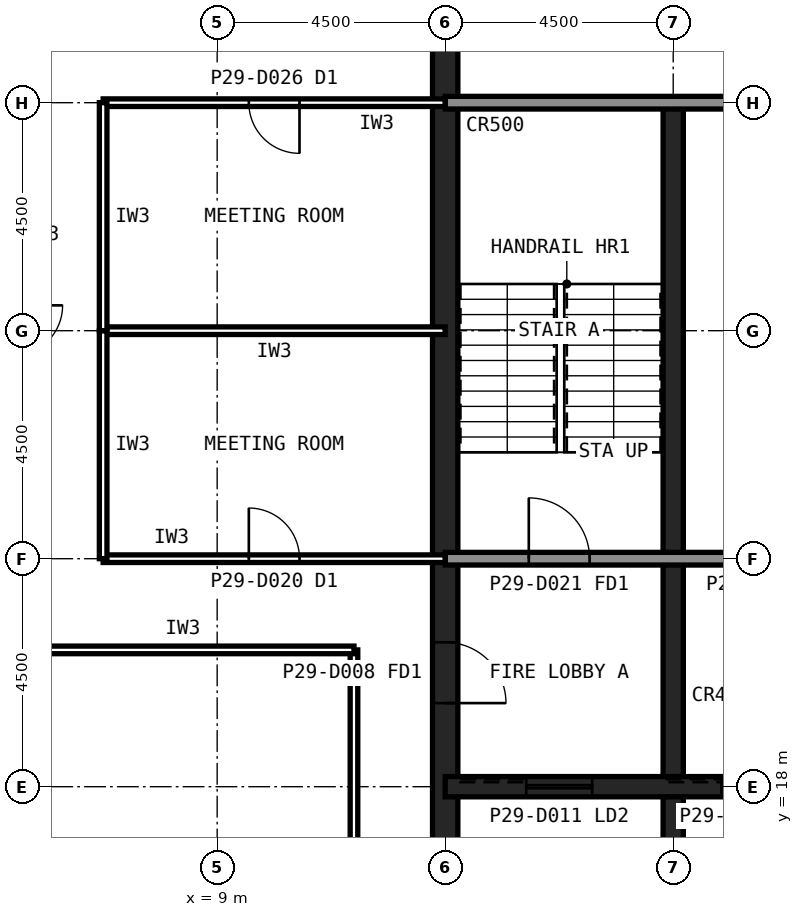
"""IFC4 building model, lengths in metres.
Left out: names, types, materials, properties, quantities, classifications, styles, units other than length and angle.
Written with IfcOpenShell. Run it as: python <this file> out.ifc"""

import sys

from ifc_helpers import new_model, si_unit, direction, frame, frame_2d, origin, place, context, subcontext, project, spatial, rectangle, extrude, element, fill, save


model = new_model("IFC4")
c1 = context("Model", 3, precision=1e-05, world=origin(), true_north=direction((0.0, 1.0)))
c2 = subcontext(c1, "Body", "Model", "MODEL_VIEW")
j1 = project(units=[si_unit("LENGTHUNIT", "METRE"), si_unit("PLANEANGLEUNIT", "RADIAN")], contexts=[c1])
p1 = place(None, origin())
s1 = spatial("IfcSite", under=j1, at=p1, CompositionType="ELEMENT")
p2 = place(p1, origin())
s2 = spatial("IfcBuilding", under=s1, at=p2, CompositionType="ELEMENT")
p3 = place(p2, frame((0.0, 0.0, 127.6)))
s3 = spatial("IfcBuildingStorey", under=s2, at=p3, CompositionType="ELEMENT", Elevation=127.6)
p4 = place(p3, frame((13.5, 40.5, 0.0), z_axis=(0.0, 0.0, 1.0), x_axis=(0.0, -1.0, 0.0)))
e1 = element("IfcWall", 1, at=p4, inside=s3, PredefinedType="SHEAR", context=c2, shape_type="SweptSolid", body=[
    extrude(rectangle(XDim=27.0, YDim=0.5, at=frame_2d((13.5, 0.0))), origin(), (0.0, 0.0, 1.0), 4.0),
])
p5 = place(p4, frame((19.65, 0.0, 0.0)))
e2 = element("IfcOpeningElement", 2, at=p5, cuts=e1, PredefinedType="OPENING", context=c2, shape_type="SweptSolid", body=[
    extrude(rectangle(XDim=1.2, YDim=2.1, at=frame_2d((0.6, 1.05))), frame((0.0, 0.26, 0.0), z_axis=(0.0, -1.0, 0.0), x_axis=(1.0, 0.0, 0.0)), (0.0, 0.0, 1.0), 0.52),
])
p6 = place(p4, frame((5.85, 0.0, 0.0)))
e3 = element("IfcOpeningElement", 3, at=p6, cuts=e1, PredefinedType="OPENING", context=c2, shape_type="SweptSolid", body=[
    extrude(rectangle(XDim=1.8, YDim=2.1, at=frame_2d((0.9, 1.05))), frame((0.0, 0.26, 0.0), z_axis=(0.0, -1.0, 0.0), x_axis=(1.0, 0.0, 0.0)), (0.0, 0.0, 1.0), 0.52),
])
p7 = place(p3, frame((18.0, 13.5, 0.0), z_axis=(0.0, 0.0, 1.0), x_axis=(0.0, 1.0, 0.0)))
e4 = element("IfcWall", 4, at=p7, inside=s3, PredefinedType="SHEAR", context=c2, shape_type="SweptSolid", body=[
    extrude(rectangle(XDim=18.0, YDim=0.4, at=frame_2d((9.0, 0.0))), origin(), (0.0, 0.0, 1.0), 4.0),
])
p8 = place(p3, frame((13.5, 18.0, 0.0), z_axis=(0.0, 0.0, 1.0), x_axis=(1.0, 0.0, 0.0)))
e5 = element("IfcWall", 5, at=p8, inside=s3, PredefinedType="SHEAR", context=c2, shape_type="SweptSolid", body=[
    extrude(rectangle(XDim=27.0, YDim=0.4, at=frame_2d((13.5, 0.0))), origin(), (0.0, 0.0, 1.0), 4.0),
])
p9 = place(p8, frame((24.3, 0.0, 0.0)))
e6 = element("IfcOpeningElement", 6, at=p9, cuts=e5, PredefinedType="OPENING", context=c2, shape_type="SweptSolid", body=[
    extrude(rectangle(XDim=0.9, YDim=2.1, at=frame_2d((0.45, 1.05))), frame((0.0, 0.21, 0.0), z_axis=(0.0, -1.0, 0.0), x_axis=(1.0, 0.0, 0.0)), (0.0, 0.0, 1.0), 0.42),
])
p10 = place(p8, frame((5.45, 0.0, 0.0)))
e7 = element("IfcOpeningElement", 7, at=p10, cuts=e5, PredefinedType="OPENING", context=c2, shape_type="SweptSolid", body=[
    extrude(rectangle(XDim=1.1, YDim=2.1, at=frame_2d((0.55, 1.05))), frame((0.0, 0.21, 0.0), z_axis=(0.0, -1.0, 0.0), x_axis=(1.0, 0.0, 0.0)), (0.0, 0.0, 1.0), 0.42),
])
p11 = place(p8, frame((8.45, 0.0, 0.0)))
e8 = element("IfcOpeningElement", 8, at=p11, cuts=e5, PredefinedType="OPENING", context=c2, shape_type="SweptSolid", body=[
    extrude(rectangle(XDim=1.1, YDim=2.1, at=frame_2d((0.55, 1.05))), frame((0.0, 0.21, 0.0), z_axis=(0.0, -1.0, 0.0), x_axis=(1.0, 0.0, 0.0)), (0.0, 0.0, 1.0), 0.42),
])
p12 = place(p8, frame((11.45, 0.0, 0.0)))
e9 = element("IfcOpeningElement", 9, at=p12, cuts=e5, PredefinedType="OPENING", context=c2, shape_type="SweptSolid", body=[
    extrude(rectangle(XDim=1.1, YDim=2.1, at=frame_2d((0.55, 1.05))), frame((0.0, 0.21, 0.0), z_axis=(0.0, -1.0, 0.0), x_axis=(1.0, 0.0, 0.0)), (0.0, 0.0, 1.0), 0.42),
])
p13 = place(p8, frame((14.45, 0.0, 0.0)))
e10 = element("IfcOpeningElement", 10, at=p13, cuts=e5, PredefinedType="OPENING", context=c2, shape_type="SweptSolid", body=[
    extrude(rectangle(XDim=1.1, YDim=2.1, at=frame_2d((0.55, 1.05))), frame((0.0, 0.21, 0.0), z_axis=(0.0, -1.0, 0.0), x_axis=(1.0, 0.0, 0.0)), (0.0, 0.0, 1.0), 0.42),
])
p14 = place(p8, frame((17.45, 0.0, 0.0)))
e11 = element("IfcOpeningElement", 11, at=p14, cuts=e5, PredefinedType="OPENING", context=c2, shape_type="SweptSolid", body=[
    extrude(rectangle(XDim=1.1, YDim=2.1, at=frame_2d((0.55, 1.05))), frame((0.0, 0.21, 0.0), z_axis=(0.0, -1.0, 0.0), x_axis=(1.0, 0.0, 0.0)), (0.0, 0.0, 1.0), 0.42),
])
p15 = place(p8, frame((20.45, 0.0, 0.0)))
e12 = element("IfcOpeningElement", 12, at=p15, cuts=e5, PredefinedType="OPENING", context=c2, shape_type="SweptSolid", body=[
    extrude(rectangle(XDim=1.1, YDim=2.1, at=frame_2d((0.55, 1.05))), frame((0.0, 0.21, 0.0), z_axis=(0.0, -1.0, 0.0), x_axis=(1.0, 0.0, 0.0)), (0.0, 0.0, 1.0), 0.42),
])
p16 = place(p8, frame((1.6, 0.0, 0.0)))
e13 = element("IfcOpeningElement", 13, at=p16, cuts=e5, PredefinedType="OPENING", context=c2, shape_type="SweptSolid", body=[
    extrude(rectangle(XDim=1.3, YDim=2.2, at=frame_2d((0.65, 1.1))), frame((0.0, 0.21, 0.0), z_axis=(0.0, -1.0, 0.0), x_axis=(1.0, 0.0, 0.0)), (0.0, 0.0, 1.0), 0.42),
])
p17 = place(p3, frame((13.5, 22.5, 0.0), z_axis=(0.0, 0.0, 1.0), x_axis=(1.0, 0.0, 0.0)))
e14 = element("IfcWall", 14, at=p17, inside=s3, PredefinedType="SOLIDWALL", context=c2, shape_type="SweptSolid", body=[
    extrude(rectangle(XDim=27.0, YDim=0.25, at=frame_2d((13.5, 0.0))), origin(), (0.0, 0.0, 1.0), 3.84),
])
p18 = place(p17, frame((1.65, 0.0, 0.0)))
e15 = element("IfcOpeningElement", 15, at=p18, cuts=e14, PredefinedType="OPENING", context=c2, shape_type="SweptSolid", body=[
    extrude(rectangle(XDim=1.2, YDim=2.1, at=frame_2d((0.6, 1.05))), frame((0.0, 0.135, 0.0), z_axis=(0.0, -1.0, 0.0), x_axis=(1.0, 0.0, 0.0)), (0.0, 0.0, 1.0), 0.27),
])
p19 = place(p17, frame((6.025, 0.0, 0.0)))
e16 = element("IfcOpeningElement", 16, at=p19, cuts=e14, PredefinedType="OPENING", context=c2, shape_type="SweptSolid", body=[
    extrude(rectangle(XDim=1.0, YDim=2.1, at=frame_2d((0.5, 1.05))), frame((0.0, 0.135, 0.0), z_axis=(0.0, -1.0, 0.0), x_axis=(1.0, 0.0, 0.0)), (0.0, 0.0, 1.0), 0.27),
])
p20 = place(p17, frame((10.525, 0.0, 0.0)))
e17 = element("IfcOpeningElement", 17, at=p20, cuts=e14, PredefinedType="OPENING", context=c2, shape_type="SweptSolid", body=[
    extrude(rectangle(XDim=1.0, YDim=2.1, at=frame_2d((0.5, 1.05))), frame((0.0, 0.135, 0.0), z_axis=(0.0, -1.0, 0.0), x_axis=(1.0, 0.0, 0.0)), (0.0, 0.0, 1.0), 0.27),
])
p21 = place(p17, frame((19.75, 0.0, 0.0)))
e18 = element("IfcOpeningElement", 18, at=p21, cuts=e14, PredefinedType="OPENING", context=c2, shape_type="SweptSolid", body=[
    extrude(rectangle(XDim=1.0, YDim=2.1, at=frame_2d((0.5, 1.05))), frame((0.0, 0.135, 0.0), z_axis=(0.0, -1.0, 0.0), x_axis=(1.0, 0.0, 0.0)), (0.0, 0.0, 1.0), 0.27),
])
p22 = place(p17, frame((15.05, 0.0, 0.0)))
e19 = element("IfcOpeningElement", 19, at=p22, cuts=e14, PredefinedType="OPENING", context=c2, shape_type="SweptSolid", body=[
    extrude(rectangle(XDim=1.4, YDim=2.4, at=frame_2d((0.7, 1.2))), frame((0.0, 0.135, 0.0), z_axis=(0.0, -1.0, 0.0), x_axis=(1.0, 0.0, 0.0)), (0.0, 0.0, 1.0), 0.27),
])
p23 = place(p3, frame((13.5, 31.5, 0.0), z_axis=(0.0, 0.0, 1.0), x_axis=(1.0, 0.0, 0.0)))
e20 = element("IfcWall", 20, at=p23, inside=s3, PredefinedType="SOLIDWALL", context=c2, shape_type="SweptSolid", body=[
    extrude(rectangle(XDim=27.0, YDim=0.25, at=frame_2d((13.5, 0.0))), origin(), (0.0, 0.0, 1.0), 3.84),
])
p24 = place(p23, frame((24.15, 0.0, 0.0)))
e21 = element("IfcOpeningElement", 21, at=p24, cuts=e20, PredefinedType="OPENING", context=c2, shape_type="SweptSolid", body=[
    extrude(rectangle(XDim=1.2, YDim=2.1, at=frame_2d((0.6, 1.05))), frame((0.0, 0.135, 0.0), z_axis=(0.0, -1.0, 0.0), x_axis=(1.0, 0.0, 0.0)), (0.0, 0.0, 1.0), 0.27),
])
p25 = place(p23, frame((15.3, 0.0, 0.0)))
e22 = element("IfcOpeningElement", 22, at=p25, cuts=e20, PredefinedType="OPENING", context=c2, shape_type="SweptSolid", body=[
    extrude(rectangle(XDim=0.9, YDim=2.1, at=frame_2d((0.45, 1.05))), frame((0.0, 0.135, 0.0), z_axis=(0.0, -1.0, 0.0), x_axis=(1.0, 0.0, 0.0)), (0.0, 0.0, 1.0), 0.27),
])
p26 = place(p23, frame((19.8, 0.0, 0.0)))
e23 = element("IfcOpeningElement", 23, at=p26, cuts=e20, PredefinedType="OPENING", context=c2, shape_type="SweptSolid", body=[
    extrude(rectangle(XDim=0.9, YDim=2.1, at=frame_2d((0.45, 1.05))), frame((0.0, 0.135, 0.0), z_axis=(0.0, -1.0, 0.0), x_axis=(1.0, 0.0, 0.0)), (0.0, 0.0, 1.0), 0.27),
])
p27 = place(p3, frame((11.7, 20.7, 0.0), z_axis=(0.0, 0.0, 1.0), x_axis=(0.0, -1.0, 0.0)))
e24 = element("IfcWall", 24, at=p27, inside=s3, PredefinedType="PARTITIONING", context=c2, shape_type="SweptSolid", body=[
    extrude(rectangle(XDim=9.0, YDim=0.15, at=frame_2d((4.5, 0.0))), origin(), (0.0, 0.0, 1.0), 3.84),
])
p28 = place(p3, frame((4.95, 20.7, 0.0), z_axis=(0.0, 0.0, 1.0), x_axis=(1.0, 0.0, 0.0)))
e25 = element("IfcWall", 25, at=p28, inside=s3, PredefinedType="PARTITIONING", context=c2, shape_type="SweptSolid", body=[
    extrude(rectangle(XDim=6.75, YDim=0.15, at=frame_2d((3.375, 0.0))), origin(), (0.0, 0.0, 1.0), 3.84),
])
p29 = place(p3, frame((6.75, 22.5, 0.0), z_axis=(0.0, 0.0, 1.0), x_axis=(1.0, 0.0, 0.0)))
e26 = element("IfcWall", 26, at=p29, inside=s3, PredefinedType="PARTITIONING", context=c2, shape_type="SweptSolid", body=[
    extrude(rectangle(XDim=6.75, YDim=0.15, at=frame_2d((3.375, 0.0))), origin(), (0.0, 0.0, 1.0), 2.989),
])
p30 = place(p29, frame((2.875, 0.0, 0.0)))
e27 = element("IfcOpeningElement", 27, at=p30, cuts=e26, PredefinedType="OPENING", context=c2, shape_type="SweptSolid", body=[
    extrude(rectangle(XDim=1.0, YDim=2.1, at=frame_2d((0.5, 1.05))), frame((0.0, 0.085, 0.0), z_axis=(0.0, -1.0, 0.0), x_axis=(1.0, 0.0, 0.0)), (0.0, 0.0, 1.0), 0.17),
])
p31 = place(p3, frame((13.5, 27.0, 0.0), z_axis=(0.0, 0.0, 1.0), x_axis=(-1.0, 0.0, 0.0)))
e28 = element("IfcWall", 28, at=p31, inside=s3, PredefinedType="PARTITIONING", context=c2, shape_type="SweptSolid", body=[
    extrude(rectangle(XDim=6.75, YDim=0.15, at=frame_2d((3.375, 0.0))), origin(), (0.0, 0.0, 1.0), 2.989),
])
p32 = place(p3, frame((6.75, 27.0, 0.0), z_axis=(0.0, 0.0, 1.0), x_axis=(0.0, -1.0, 0.0)))
e29 = element("IfcWall", 29, at=p32, inside=s3, PredefinedType="PARTITIONING", context=c2, shape_type="SweptSolid", body=[
    extrude(rectangle(XDim=4.5, YDim=0.15, at=frame_2d((2.25, 0.0))), origin(), (0.0, 0.0, 1.0), 3.84),
])
p33 = place(p3, frame((13.5, 31.5, 0.0), z_axis=(0.0, 0.0, 1.0), x_axis=(-1.0, 0.0, 0.0)))
e30 = element("IfcWall", 30, at=p33, inside=s3, PredefinedType="PARTITIONING", context=c2, shape_type="SweptSolid", body=[
    extrude(rectangle(XDim=6.75, YDim=0.15, at=frame_2d((3.375, 0.0))), origin(), (0.0, 0.0, 1.0), 2.989),
])
p34 = place(p33, frame((2.875, 0.0, 0.0)))
e31 = element("IfcOpeningElement", 31, at=p34, cuts=e30, PredefinedType="OPENING", context=c2, shape_type="SweptSolid", body=[
    extrude(rectangle(XDim=1.0, YDim=2.1, at=frame_2d((0.5, 1.05))), frame((0.0, 0.085, 0.0), z_axis=(0.0, -1.0, 0.0), x_axis=(1.0, 0.0, 0.0)), (0.0, 0.0, 1.0), 0.17),
])
p35 = place(p3, frame((6.75, 31.5, 0.0), z_axis=(0.0, 0.0, 1.0), x_axis=(0.0, -1.0, 0.0)))
e32 = element("IfcWall", 32, at=p35, inside=s3, PredefinedType="PARTITIONING", context=c2, shape_type="SweptSolid", body=[
    extrude(rectangle(XDim=4.5, YDim=0.15, at=frame_2d((2.25, 0.0))), origin(), (0.0, 0.0, 1.0), 3.84),
])
p36 = place(p5, origin())
e33 = element("IfcDoor", 33, at=p36, inside=s3, OperationType="SINGLE_SWING_RIGHT", PredefinedType="DOOR", context=c2, shape_type="SweptSolid", body=[
    extrude(rectangle(XDim=1.2, YDim=2.1, at=frame_2d((0.6, 1.05))), frame((0.0, 0.025, 0.0), z_axis=(0.0, -1.0, 0.0), x_axis=(1.0, 0.0, 0.0)), (0.0, 0.0, 1.0), 0.05),
])
fill(e2, e33)
p37 = place(p18, origin())
e34 = element("IfcDoor", 34, at=p37, inside=s3, OperationType="SINGLE_SWING_LEFT", PredefinedType="DOOR", context=c2, shape_type="SweptSolid", body=[
    extrude(rectangle(XDim=1.2, YDim=2.1, at=frame_2d((0.6, 1.05))), frame((0.0, 0.025, 0.0), z_axis=(0.0, -1.0, 0.0), x_axis=(1.0, 0.0, 0.0)), (0.0, 0.0, 1.0), 0.05),
])
fill(e15, e34)
p38 = place(p10, origin())
e35 = element("IfcDoor", 35, at=p38, inside=s3, OperationType="SLIDING_TO_LEFT", PredefinedType="DOOR", context=c2, shape_type="SweptSolid", body=[
    extrude(rectangle(XDim=1.1, YDim=2.1, at=frame_2d((0.55, 1.05))), frame((0.0, 0.025, 0.0), z_axis=(0.0, -1.0, 0.0), x_axis=(1.0, 0.0, 0.0)), (0.0, 0.0, 1.0), 0.05),
])
fill(e7, e35)
p39 = place(p16, origin())
e36 = element("IfcDoor", 36, at=p39, inside=s3, OperationType="SLIDING_TO_LEFT", PredefinedType="DOOR", context=c2, shape_type="SweptSolid", body=[
    extrude(rectangle(XDim=1.3, YDim=2.2, at=frame_2d((0.65, 1.1))), frame((0.0, 0.025, 0.0), z_axis=(0.0, -1.0, 0.0), x_axis=(1.0, 0.0, 0.0)), (0.0, 0.0, 1.0), 0.05),
])
fill(e13, e36)
p40 = place(p30, origin())
e37 = element("IfcDoor", 37, at=p40, inside=s3, OperationType="SINGLE_SWING_LEFT", PredefinedType="DOOR", context=c2, shape_type="SweptSolid", body=[
    extrude(rectangle(XDim=1.0, YDim=2.1, at=frame_2d((0.5, 1.05))), frame((0.0, 0.025, 0.0), z_axis=(0.0, -1.0, 0.0), x_axis=(1.0, 0.0, 0.0)), (0.0, 0.0, 1.0), 0.05),
])
fill(e27, e37)
p41 = place(p34, origin())
e38 = element("IfcDoor", 38, at=p41, inside=s3, OperationType="SINGLE_SWING_LEFT", PredefinedType="DOOR", context=c2, shape_type="SweptSolid", body=[
    extrude(rectangle(XDim=1.0, YDim=2.1, at=frame_2d((0.5, 1.05))), frame((0.0, 0.025, 0.0), z_axis=(0.0, -1.0, 0.0), x_axis=(1.0, 0.0, 0.0)), (0.0, 0.0, 1.0), 0.05),
])
fill(e31, e38)
save(model, sys.argv[1])
